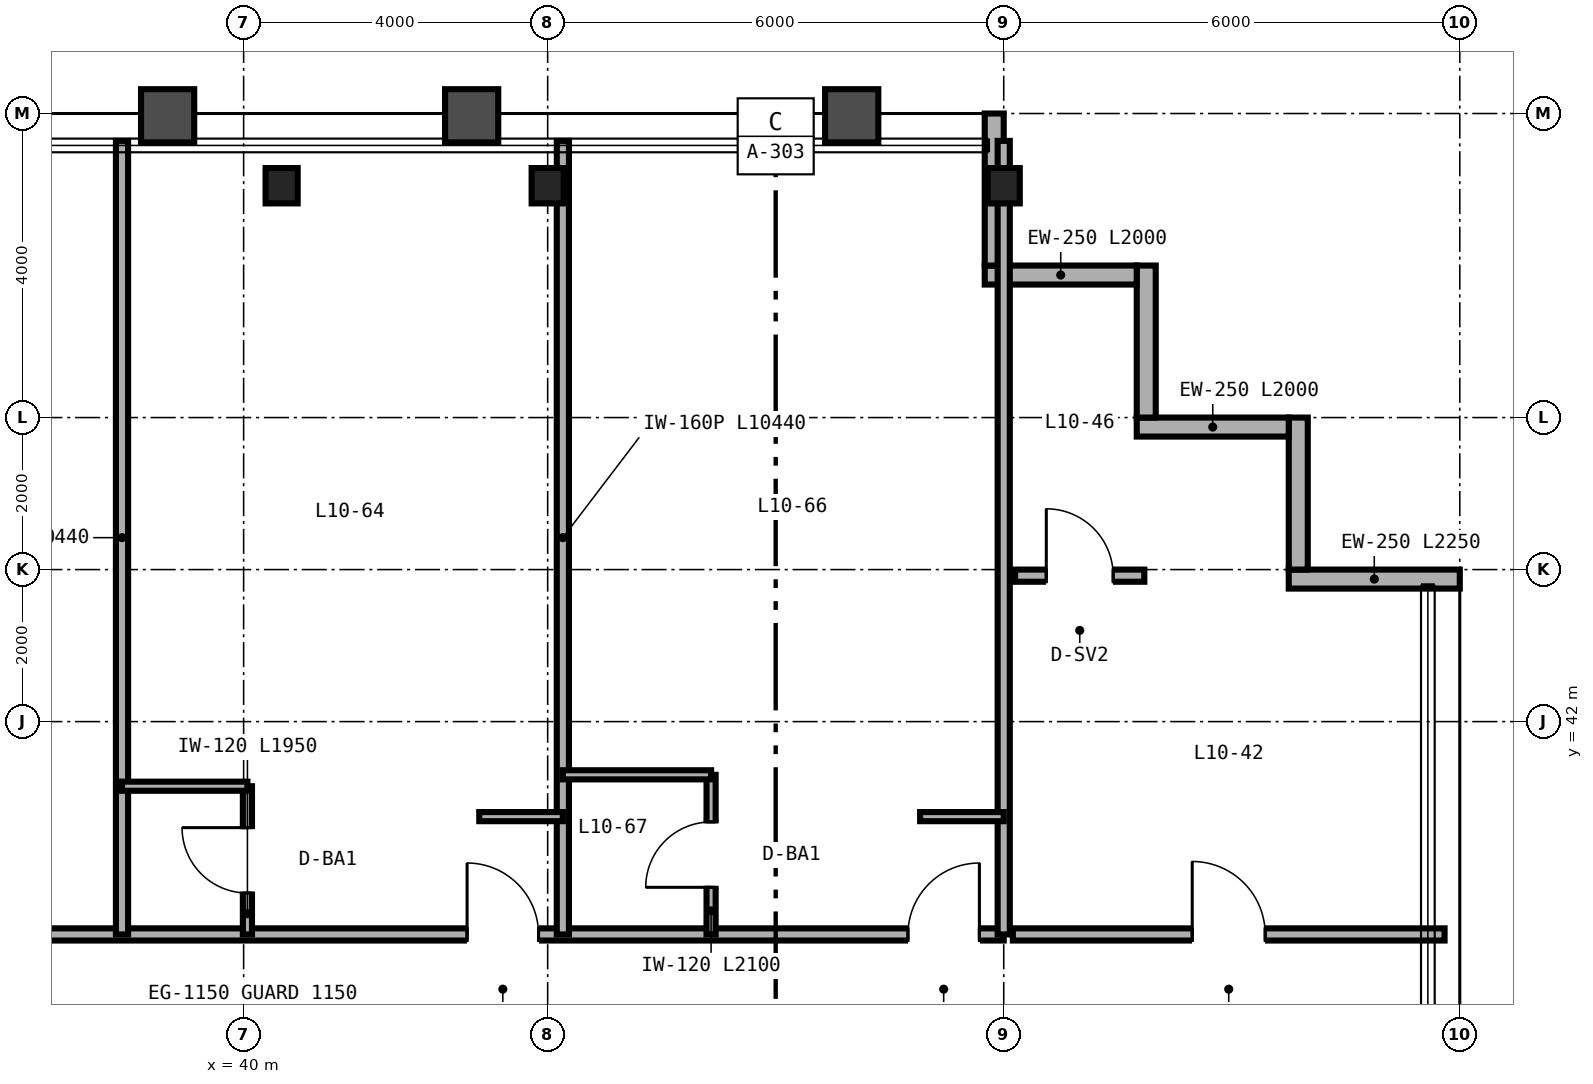
"""IFC4 building model, lengths in metres.
Left out: names, types, materials, properties, quantities, classifications, styles, units other than length and angle.
Written with IfcOpenShell. Run it as: python <this file> out.ifc"""

import sys

from ifc_helpers import new_model, si_unit, direction, frame, frame_2d, origin, origin_2d, place, context, subcontext, project, spatial, rectangle, i_section, extrude, source, transform, mapped, element, fill, save


model = new_model("IFC4")
c1 = context("Model", 3, precision=1e-05, world=origin(), true_north=direction((0.0, 1.0)))
c2 = subcontext(c1, "Body", "Model", "MODEL_VIEW")
j1 = project(units=[si_unit("LENGTHUNIT", "METRE"), si_unit("PLANEANGLEUNIT", "RADIAN")], contexts=[c1])
p1 = place(None, origin())
s1 = spatial("IfcSite", under=j1, at=p1, CompositionType="ELEMENT")
p2 = place(p1, origin())
s2 = spatial("IfcBuilding", under=s1, at=p2, CompositionType="ELEMENT")
p3 = place(p2, frame((0.0, 0.0, 45.6)))
s3 = spatial("IfcBuildingStorey", under=s2, at=p3, CompositionType="ELEMENT", Elevation=45.6)
m1 = source(origin(), c2, "Body", "SweptSolid", [
    extrude(i_section(OverallWidth=0.422, OverallDepth=0.465, WebThickness=0.045, FlangeThickness=0.073, FilletRadius=0.025, at=origin_2d()), origin(), (0.0, 0.0, 1.0), 3.35),
])
for number, where, z_axis, x_axis in (
    (1, (40.5, 49.05, 0.0), (0.0, 0.0, 1.0), (1.0, 0.0, 0.0)),
    (2, (44.0, 49.05, 0.0), (0.0, 0.0, 1.0), (1.0, 0.0, 0.0)),
    (3, (50.0, 49.05, 0.0), (0.0, 0.0, 1.0), (1.0, 0.0, 0.0)),
):
    element("IfcColumn", number, at=place(p3, frame(where, z_axis=z_axis, x_axis=x_axis)), inside=s3, PredefinedType="COLUMN", context=c2, shape_type="MappedRepresentation", body=[
        mapped(m1, transform((0.0, 0.0, 0.0), scale=1.0)),
    ])
p4 = place(p3, frame((56.0, 43.875, 0.0), z_axis=(0.0, 0.0, 1.0), x_axis=(-1.0, 0.0, 0.0)))
e4 = element("IfcWall", 4, at=p4, inside=s3, PredefinedType="SOLIDWALL", context=c2, shape_type="SweptSolid", body=[
    extrude(rectangle(XDim=2.25, YDim=0.25, at=frame_2d((1.125, 0.0))), origin(), (0.0, 0.0, 1.0), 3.35),
])
for number, where, z_axis, x_axis in (
    (5, (53.875, 44.0, 0.0), (0.0, 0.0, 1.0), (0.0, 1.0, 0.0)),
    (6, (53.75, 45.875, 0.0), (0.0, 0.0, 1.0), (-1.0, 0.0, 0.0)),
    (7, (51.875, 46.0, 0.0), (0.0, 0.0, 1.0), (0.0, 1.0, 0.0)),
    (8, (51.75, 47.875, 0.0), (0.0, 0.0, 1.0), (-1.0, 0.0, 0.0)),
):
    element("IfcWall", number, at=place(p3, frame(where, z_axis=z_axis, x_axis=x_axis)), inside=s3, PredefinedType="SOLIDWALL", context=c2, shape_type="SweptSolid", body=[
        extrude(rectangle(XDim=2.0, YDim=0.25, at=frame_2d((1.0, 0.0))), origin(), (0.0, 0.0, 1.0), 3.35),
    ])
p5 = place(p3, frame((49.875, 48.0, 0.0), z_axis=(0.0, 0.0, 1.0), x_axis=(0.0, 1.0, 0.0)))
e9 = element("IfcWall", 9, at=p5, inside=s3, PredefinedType="SOLIDWALL", context=c2, shape_type="SweptSolid", body=[
    extrude(rectangle(XDim=2.0, YDim=0.25, at=frame_2d((1.0, 0.0))), origin(), (0.0, 0.0, 1.0), 2.657),
])
p6 = place(p3, frame((50.12, 39.2, 0.0), z_axis=(0.0, 0.0, 1.0), x_axis=(1.0, 0.0, 0.0)))
e10 = element("IfcWall", 10, at=p6, inside=s3, PredefinedType="PARTITIONING", context=c2, shape_type="SweptSolid", body=[
    extrude(rectangle(XDim=5.68, YDim=0.16, at=frame_2d((2.84, 0.0))), origin(), (0.0, 0.0, 1.0), 3.35),
])
p7 = place(p6, frame((2.36, 0.0, 0.0)))
e11 = element("IfcOpeningElement", 11, at=p7, cuts=e10, PredefinedType="OPENING", context=c2, shape_type="SweptSolid", body=[
    extrude(rectangle(XDim=0.96, YDim=2.15, at=frame_2d((0.48, 1.075))), frame((0.0, 0.09, 0.0), z_axis=(0.0, -1.0, 0.0), x_axis=(1.0, 0.0, 0.0)), (0.0, 0.0, 1.0), 0.18),
])
p8 = place(p3, frame((50.15, 43.92, 0.0), z_axis=(0.0, 0.0, 1.0), x_axis=(1.0, 0.0, 0.0)))
e12 = element("IfcWall", 12, at=p8, inside=s3, PredefinedType="PARTITIONING", context=c2, shape_type="SweptSolid", body=[
    extrude(rectangle(XDim=1.7, YDim=0.16, at=frame_2d((0.85, 0.0))), origin(), (0.0, 0.0, 1.0), 3.35),
])
p9 = place(p8, frame((0.41, 0.0, 0.0)))
e13 = element("IfcOpeningElement", 13, at=p9, cuts=e12, PredefinedType="OPENING", context=c2, shape_type="SweptSolid", body=[
    extrude(rectangle(XDim=0.88, YDim=2.15, at=frame_2d((0.44, 1.075))), frame((0.0, 0.09, 0.0), z_axis=(0.0, -1.0, 0.0), x_axis=(1.0, 0.0, 0.0)), (0.0, 0.0, 1.0), 0.18),
])
p10 = place(p3, frame((14.0, 39.2, 0.0), z_axis=(0.0, 0.0, 1.0), x_axis=(1.0, 0.0, 0.0)))
e14 = element("IfcWall", 14, at=p10, inside=s3, PredefinedType="PARTITIONING", context=c2, shape_type="SweptSolid", body=[
    extrude(rectangle(XDim=36.0, YDim=0.16, at=frame_2d((18.0, 0.0))), origin(), (0.0, 0.0, 1.0), 2.571),
])
p11 = place(p10, frame((4.54, 0.0, 0.0)))
e15 = element("IfcOpeningElement", 15, at=p11, cuts=e14, PredefinedType="OPENING", context=c2, shape_type="SweptSolid", body=[
    extrude(rectangle(XDim=0.94, YDim=2.15, at=frame_2d((0.47, 1.075))), frame((0.0, 0.09, 0.0), z_axis=(0.0, -1.0, 0.0), x_axis=(1.0, 0.0, 0.0)), (0.0, 0.0, 1.0), 0.18),
])
p12 = place(p10, frame((10.29, 0.0, 0.0)))
e16 = element("IfcOpeningElement", 16, at=p12, cuts=e14, PredefinedType="OPENING", context=c2, shape_type="SweptSolid", body=[
    extrude(rectangle(XDim=0.94, YDim=2.15, at=frame_2d((0.47, 1.075))), frame((0.0, 0.09, 0.0), z_axis=(0.0, -1.0, 0.0), x_axis=(1.0, 0.0, 0.0)), (0.0, 0.0, 1.0), 0.18),
])
p13 = place(p10, frame((16.54, 0.0, 0.0)))
e17 = element("IfcOpeningElement", 17, at=p13, cuts=e14, PredefinedType="OPENING", context=c2, shape_type="SweptSolid", body=[
    extrude(rectangle(XDim=0.94, YDim=2.15, at=frame_2d((0.47, 1.075))), frame((0.0, 0.09, 0.0), z_axis=(0.0, -1.0, 0.0), x_axis=(1.0, 0.0, 0.0)), (0.0, 0.0, 1.0), 0.18),
])
p14 = place(p10, frame((20.62, 0.0, 0.0)))
e18 = element("IfcOpeningElement", 18, at=p14, cuts=e14, PredefinedType="OPENING", context=c2, shape_type="SweptSolid", body=[
    extrude(rectangle(XDim=0.96, YDim=2.15, at=frame_2d((0.48, 1.075))), frame((0.0, 0.09, 0.0), z_axis=(0.0, -1.0, 0.0), x_axis=(1.0, 0.0, 0.0)), (0.0, 0.0, 1.0), 0.18),
])
p15 = place(p10, frame((28.94, 0.0, 0.0)))
e19 = element("IfcOpeningElement", 19, at=p15, cuts=e14, PredefinedType="OPENING", context=c2, shape_type="SweptSolid", body=[
    extrude(rectangle(XDim=0.94, YDim=2.15, at=frame_2d((0.47, 1.075))), frame((0.0, 0.09, 0.0), z_axis=(0.0, -1.0, 0.0), x_axis=(1.0, 0.0, 0.0)), (0.0, 0.0, 1.0), 0.18),
])
p16 = place(p10, frame((34.74, 0.0, 0.0)))
e20 = element("IfcOpeningElement", 20, at=p16, cuts=e14, PredefinedType="OPENING", context=c2, shape_type="SweptSolid", body=[
    extrude(rectangle(XDim=0.94, YDim=2.15, at=frame_2d((0.47, 1.075))), frame((0.0, 0.09, 0.0), z_axis=(0.0, -1.0, 0.0), x_axis=(1.0, 0.0, 0.0)), (0.0, 0.0, 1.0), 0.18),
])
p17 = place(p3, frame((50.0, 39.2, 0.0), z_axis=(0.0, 0.0, 1.0), x_axis=(0.0, 1.0, 0.0)))
e21 = element("IfcWall", 21, at=p17, inside=s3, PredefinedType="PARTITIONING", context=c2, shape_type="SweptSolid", body=[
    extrude(rectangle(XDim=10.44, YDim=0.16, at=frame_2d((5.22, 0.0))), origin(), (0.0, 0.0, 1.0), 2.657),
])
p18 = place(p3, frame((38.4, 39.2, 0.0), z_axis=(0.0, 0.0, 1.0), x_axis=(0.0, 1.0, 0.0)))
e22 = element("IfcWall", 22, at=p18, inside=s3, PredefinedType="PARTITIONING", context=c2, shape_type="SweptSolid", body=[
    extrude(rectangle(XDim=10.44, YDim=0.16, at=frame_2d((5.22, 0.0))), origin(), (0.0, 0.0, 1.0), 2.423),
])
p19 = place(p3, frame((44.2, 39.2, 0.0), z_axis=(0.0, 0.0, 1.0), x_axis=(0.0, 1.0, 0.0)))
e23 = element("IfcWall", 23, at=p19, inside=s3, PredefinedType="PARTITIONING", context=c2, shape_type="SweptSolid", body=[
    extrude(rectangle(XDim=10.44, YDim=0.16, at=frame_2d((5.22, 0.0))), origin(), (0.0, 0.0, 1.0), 2.657),
])
p20 = place(p3, frame((40.05, 39.2, 0.0), z_axis=(0.0, 0.0, 1.0), x_axis=(0.0, 1.0, 0.0)))
e24 = element("IfcWall", 24, at=p20, inside=s3, PredefinedType="PARTITIONING", context=c2, shape_type="SweptSolid", body=[
    extrude(rectangle(XDim=1.95, YDim=0.12, at=frame_2d((0.975, 0.0))), origin(), (0.0, 0.0, 1.0), 3.35),
])
p21 = place(p20, frame((0.545, 0.0, 0.0)))
e25 = element("IfcOpeningElement", 25, at=p21, cuts=e24, PredefinedType="OPENING", context=c2, shape_type="SweptSolid", body=[
    extrude(rectangle(XDim=0.86, YDim=2.1, at=frame_2d((0.43, 1.05))), frame((0.0, 0.07, 0.0), z_axis=(0.0, -1.0, 0.0), x_axis=(1.0, 0.0, 0.0)), (0.0, 0.0, 1.0), 0.14),
])
p22 = place(p3, frame((38.4, 41.15, 0.0), z_axis=(0.0, 0.0, 1.0), x_axis=(1.0, 0.0, 0.0)))
e26 = element("IfcWall", 26, at=p22, inside=s3, PredefinedType="PARTITIONING", context=c2, shape_type="SweptSolid", body=[
    extrude(rectangle(XDim=1.65, YDim=0.12, at=frame_2d((0.825, 0.0))), origin(), (0.0, 0.0, 1.0), 3.35),
])
p23 = place(p3, frame((43.1, 40.75, 0.0), z_axis=(0.0, 0.0, 1.0), x_axis=(1.0, 0.0, 0.0)))
e27 = element("IfcWall", 27, at=p23, inside=s3, PredefinedType="PARTITIONING", context=c2, shape_type="SweptSolid", body=[
    extrude(rectangle(XDim=1.1, YDim=0.12, at=frame_2d((0.55, 0.0))), origin(), (0.0, 0.0, 1.0), 3.35),
])
p24 = place(p3, frame((46.15, 39.2, 0.0), z_axis=(0.0, 0.0, 1.0), x_axis=(0.0, 1.0, 0.0)))
e28 = element("IfcWall", 28, at=p24, inside=s3, PredefinedType="PARTITIONING", context=c2, shape_type="SweptSolid", body=[
    extrude(rectangle(XDim=2.1, YDim=0.12, at=frame_2d((1.05, 0.0))), origin(), (0.0, 0.0, 1.0), 3.35),
])
p25 = place(p24, frame((0.62, 0.0, 0.0)))
e29 = element("IfcOpeningElement", 29, at=p25, cuts=e28, PredefinedType="OPENING", context=c2, shape_type="SweptSolid", body=[
    extrude(rectangle(XDim=0.86, YDim=2.1, at=frame_2d((0.43, 1.05))), frame((0.0, 0.07, 0.0), z_axis=(0.0, -1.0, 0.0), x_axis=(1.0, 0.0, 0.0)), (0.0, 0.0, 1.0), 0.14),
])
p26 = place(p3, frame((44.2, 41.3, 0.0), z_axis=(0.0, 0.0, 1.0), x_axis=(1.0, 0.0, 0.0)))
e30 = element("IfcWall", 30, at=p26, inside=s3, PredefinedType="PARTITIONING", context=c2, shape_type="SweptSolid", body=[
    extrude(rectangle(XDim=1.95, YDim=0.12, at=frame_2d((0.975, 0.0))), origin(), (0.0, 0.0, 1.0), 3.35),
])
p27 = place(p3, frame((48.9, 40.75, 0.0), z_axis=(0.0, 0.0, 1.0), x_axis=(1.0, 0.0, 0.0)))
e31 = element("IfcWall", 31, at=p27, inside=s3, PredefinedType="PARTITIONING", context=c2, shape_type="SweptSolid", body=[
    extrude(rectangle(XDim=1.1, YDim=0.12, at=frame_2d((0.55, 0.0))), origin(), (0.0, 0.0, 1.0), 3.35),
])
m2 = source(origin(), c2, "Body", "SweptSolid", [
    extrude(rectangle(XDim=0.96, YDim=2.15, at=frame_2d((0.48, 1.075))), frame((0.0, 0.025, 0.0), z_axis=(0.0, -1.0, 0.0), x_axis=(1.0, 0.0, 0.0)), (0.0, 0.0, 1.0), 0.05),
])
p28 = place(p7, origin())
e32 = element("IfcDoor", 32, at=p28, inside=s3, OperationType="SINGLE_SWING_LEFT", PredefinedType="DOOR", context=c2, shape_type="MappedRepresentation", body=[
    mapped(m2, transform((0.0, 0.0, 0.0), scale=1.0)),
])
fill(e11, e32)
m3 = source(origin(), c2, "Body", "SweptSolid", [
    extrude(rectangle(XDim=0.88, YDim=2.15, at=frame_2d((0.44, 1.075))), frame((0.0, 0.025, 0.0), z_axis=(0.0, -1.0, 0.0), x_axis=(1.0, 0.0, 0.0)), (0.0, 0.0, 1.0), 0.05),
])
p29 = place(p9, origin())
e33 = element("IfcDoor", 33, at=p29, inside=s3, OperationType="SINGLE_SWING_LEFT", PredefinedType="DOOR", context=c2, shape_type="MappedRepresentation", body=[
    mapped(m3, transform((0.0, 0.0, 0.0), scale=1.0)),
])
fill(e13, e33)
m4 = source(origin(), c2, "Body", "SweptSolid", [
    extrude(rectangle(XDim=0.86, YDim=2.1, at=frame_2d((0.43, 1.05))), frame((0.0, 0.025, 0.0), z_axis=(0.0, -1.0, 0.0), x_axis=(1.0, 0.0, 0.0)), (0.0, 0.0, 1.0), 0.05),
])
p30 = place(p21, origin())
e34 = element("IfcDoor", 34, at=p30, inside=s3, OperationType="SINGLE_SWING_RIGHT", PredefinedType="DOOR", context=c2, shape_type="MappedRepresentation", body=[
    mapped(m4, transform((0.0, 0.0, 0.0), scale=1.0)),
])
fill(e25, e34)
p31 = place(p25, origin())
e35 = element("IfcDoor", 35, at=p31, inside=s3, OperationType="SINGLE_SWING_LEFT", PredefinedType="DOOR", context=c2, shape_type="MappedRepresentation", body=[
    mapped(m4, transform((0.0, 0.0, 0.0), scale=1.0)),
])
fill(e29, e35)
m5 = source(origin(), c2, "Body", "SweptSolid", [
    extrude(rectangle(XDim=0.94, YDim=2.15, at=frame_2d((0.47, 1.075))), frame((0.0, 0.025, 0.0), z_axis=(0.0, -1.0, 0.0), x_axis=(1.0, 0.0, 0.0)), (0.0, 0.0, 1.0), 0.05),
])
p32 = place(p15, origin())
e36 = element("IfcDoor", 36, at=p32, inside=s3, OperationType="SINGLE_SWING_LEFT", PredefinedType="DOOR", context=c2, shape_type="MappedRepresentation", body=[
    mapped(m5, transform((0.0, 0.0, 0.0), scale=1.0)),
])
fill(e19, e36)
p33 = place(p16, origin())
e37 = element("IfcDoor", 37, at=p33, inside=s3, OperationType="SINGLE_SWING_RIGHT", PredefinedType="DOOR", context=c2, shape_type="MappedRepresentation", body=[
    mapped(m5, transform((0.0, 0.0, 0.0), scale=1.0)),
])
fill(e20, e37)
save(model, sys.argv[1])
